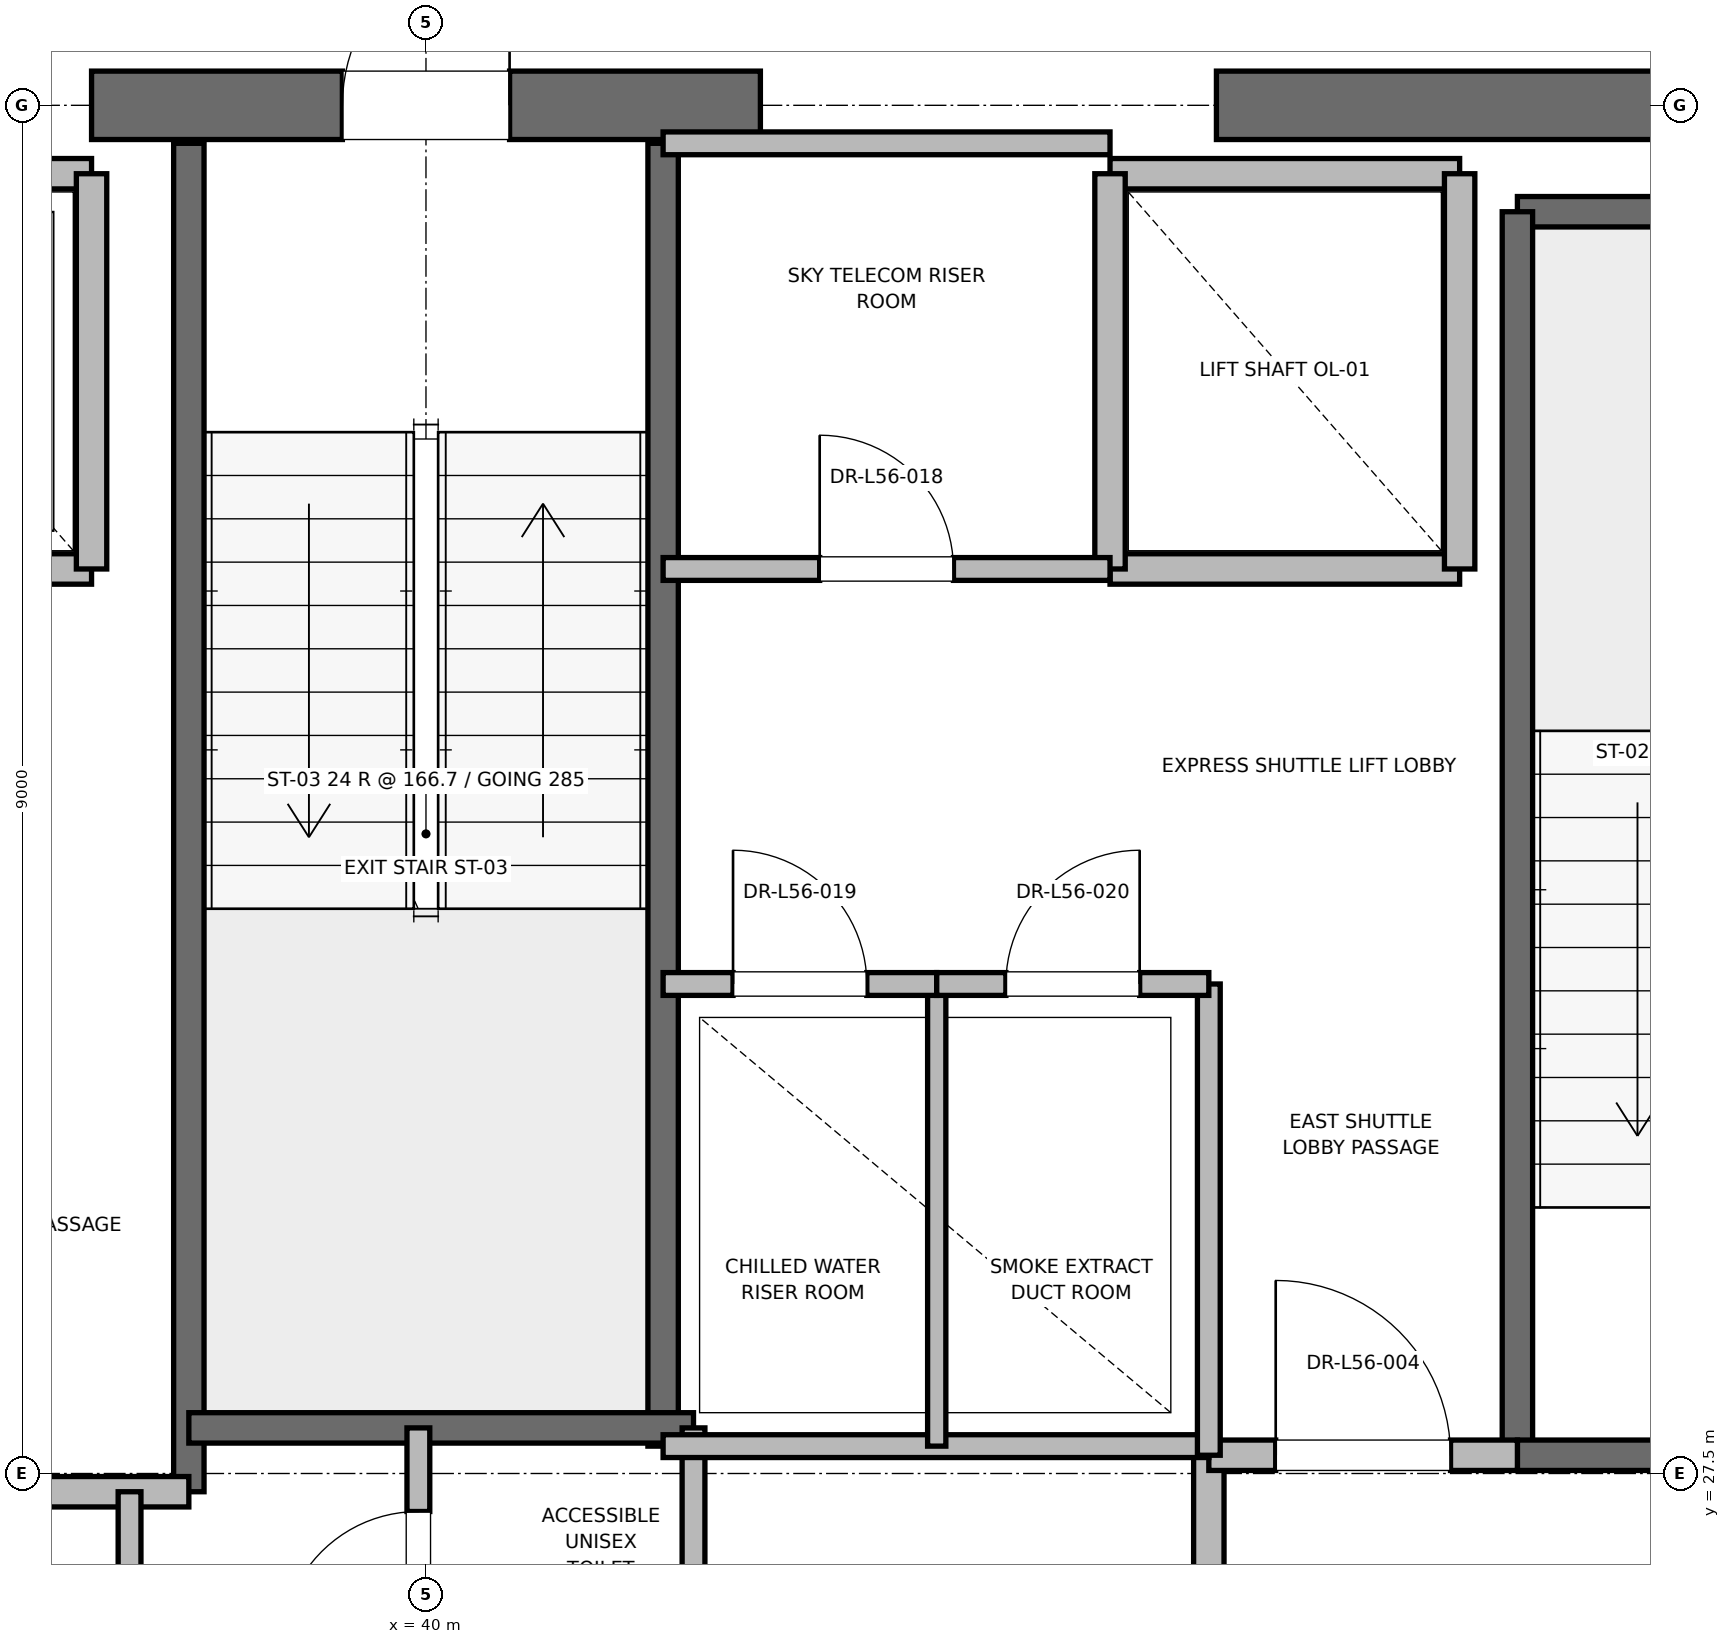
"""IFC4 building model, lengths in metres.
Left out: names, types, materials, properties, quantities, classifications, styles, units other than length and angle.
Written with IfcOpenShell. Run it as: python <this file> out.ifc"""

import sys

from ifc_helpers import new_model, si_unit, direction, frame, frame_2d, origin, place, context, subcontext, project, spatial, rectangle, extrude, element, fill, save


model = new_model("IFC4")
c1 = context("Model", 3, precision=1e-05, world=origin(), true_north=direction((0.0, 1.0)))
c2 = subcontext(c1, "Body", "Model", "MODEL_VIEW")
j1 = project(units=[si_unit("LENGTHUNIT", "METRE"), si_unit("PLANEANGLEUNIT", "RADIAN")], contexts=[c1])
p1 = place(None, origin())
s1 = spatial("IfcSite", under=j1, at=p1, CompositionType="ELEMENT")
p2 = place(p1, origin())
s2 = spatial("IfcBuilding", under=s1, at=p2, CompositionType="ELEMENT")
p3 = place(p2, frame((0.0, 0.0, 243.2)))
s3 = spatial("IfcBuildingStorey", under=s2, at=p3, CompositionType="ELEMENT", Elevation=243.2)
p4 = place(p3, frame((37.8, 36.5, 0.0), z_axis=(0.0, 0.0, 1.0), x_axis=(1.0, 0.0, 0.0)))
e1 = element("IfcWall", 1, at=p4, inside=s3, PredefinedType="SHEAR", context=c2, shape_type="SweptSolid", body=[
    extrude(rectangle(XDim=4.4, YDim=0.45, at=frame_2d((2.2, 0.0))), origin(), (0.0, 0.0, 1.0), 3.785),
])
p5 = place(p4, frame((1.65, 0.0, 0.0)))
e2 = element("IfcOpeningElement", 2, at=p5, cuts=e1, PredefinedType="OPENING", context=c2, shape_type="SweptSolid", body=[
    extrude(rectangle(XDim=1.1, YDim=2.15, at=frame_2d((0.55, 1.075))), frame((0.0, 0.225, 0.0), z_axis=(0.0, -1.0, 0.0), x_axis=(1.0, 0.0, 0.0)), (0.0, 0.0, 1.0), 0.45),
])
p6 = place(p3, frame((45.2, 36.5, 0.0), z_axis=(0.0, 0.0, 1.0), x_axis=(1.0, 0.0, 0.0)))
e3 = element("IfcWall", 3, at=p6, inside=s3, PredefinedType="SHEAR", context=c2, shape_type="SweptSolid", body=[
    extrude(rectangle(XDim=5.8, YDim=0.45, at=frame_2d((2.9, 0.0))), origin(), (0.0, 0.0, 1.0), 3.785),
])
p7 = place(p3, frame((47.18, 35.8, 0.0), z_axis=(0.0, 0.0, 1.0), x_axis=(1.0, 0.0, 0.0)))
e4 = element("IfcWall", 4, at=p7, inside=s3, PredefinedType="SOLIDWALL", context=c2, shape_type="SweptSolid", body=[
    extrude(rectangle(XDim=3.12, YDim=0.2, at=frame_2d((1.56, 0.0))), origin(), (0.0, 0.0, 1.0), 3.785),
])
p8 = place(p3, frame((47.18, 27.62, 0.0), z_axis=(0.0, 0.0, 1.0), x_axis=(0.0, 1.0, 0.0)))
e5 = element("IfcWall", 5, at=p8, inside=s3, PredefinedType="SOLIDWALL", context=c2, shape_type="SweptSolid", body=[
    extrude(rectangle(XDim=8.18, YDim=0.2, at=frame_2d((4.09, 0.0))), origin(), (0.0, 0.0, 1.0), 3.785),
])
p9 = place(p3, frame((47.18, 27.62, 0.0), z_axis=(0.0, 0.0, 1.0), x_axis=(1.0, 0.0, 0.0)))
e6 = element("IfcWall", 6, at=p9, inside=s3, PredefinedType="SOLIDWALL", context=c2, shape_type="SweptSolid", body=[
    extrude(rectangle(XDim=3.12, YDim=0.2, at=frame_2d((1.56, 0.0))), origin(), (0.0, 0.0, 1.0), 3.785),
])
p10 = place(p9, frame((1.01, 0.0, 0.0)))
e7 = element("IfcOpeningElement", 7, at=p10, cuts=e6, PredefinedType="OPENING", context=c2, shape_type="SweptSolid", body=[
    extrude(rectangle(XDim=1.1, YDim=2.15, at=frame_2d((0.55, 1.075))), frame((0.0, 0.1, 0.0), z_axis=(0.0, -1.0, 0.0), x_axis=(1.0, 0.0, 0.0)), (0.0, 0.0, 1.0), 0.2),
])
p11 = place(p3, frame((38.44, 27.38, 0.0), z_axis=(0.0, 0.0, 1.0), x_axis=(0.0, 1.0, 0.0)))
e8 = element("IfcWall", 8, at=p11, inside=s3, PredefinedType="SOLIDWALL", context=c2, shape_type="SweptSolid", body=[
    extrude(rectangle(XDim=8.87, YDim=0.2, at=frame_2d((4.435, 0.0))), origin(), (0.0, 0.0, 1.0), 3.785),
])
p12 = place(p3, frame((41.56, 27.68, 0.0), z_axis=(0.0, 0.0, 1.0), x_axis=(0.0, 1.0, 0.0)))
e9 = element("IfcWall", 9, at=p12, inside=s3, PredefinedType="SOLIDWALL", context=c2, shape_type="SweptSolid", body=[
    extrude(rectangle(XDim=8.57, YDim=0.2, at=frame_2d((4.285, 0.0))), origin(), (0.0, 0.0, 1.0), 3.785),
])
p13 = place(p3, frame((38.44, 27.8, 0.0), z_axis=(0.0, 0.0, 1.0), x_axis=(1.0, 0.0, 0.0)))
e10 = element("IfcWall", 10, at=p13, inside=s3, PredefinedType="SOLIDWALL", context=c2, shape_type="SweptSolid", body=[
    extrude(rectangle(XDim=3.32, YDim=0.2, at=frame_2d((1.66, 0.0))), origin(), (0.0, 0.0, 1.0), 3.785),
])
p14 = place(p3, frame((32.82, 27.38, 0.0), z_axis=(0.0, 0.0, 1.0), x_axis=(1.0, 0.0, 0.0)))
e11 = element("IfcWall", 11, at=p14, inside=s3, PredefinedType="PARTITIONING", context=c2, shape_type="SweptSolid", body=[
    extrude(rectangle(XDim=5.62, YDim=0.2, at=frame_2d((2.81, 0.0))), origin(), (0.0, 0.0, 1.0), 3.785),
])
p15 = place(p3, frame((45.15, 24.25, 0.0), z_axis=(0.0, 0.0, 1.0), x_axis=(0.0, 1.0, 0.0)))
e12 = element("IfcWall", 12, at=p15, inside=s3, PredefinedType="PARTITIONING", context=c2, shape_type="SweptSolid", body=[
    extrude(rectangle(XDim=3.37, YDim=0.2, at=frame_2d((1.685, 0.0))), origin(), (0.0, 0.0, 1.0), 3.785),
])
p16 = place(p3, frame((45.15, 27.62, 0.0), z_axis=(0.0, 0.0, 1.0), x_axis=(1.0, 0.0, 0.0)))
e13 = element("IfcWall", 13, at=p16, inside=s3, PredefinedType="PARTITIONING", context=c2, shape_type="SweptSolid", body=[
    extrude(rectangle(XDim=2.03, YDim=0.2, at=frame_2d((1.015, 0.0))), origin(), (0.0, 0.0, 1.0), 3.785),
])
p17 = place(p16, frame((0.44, 0.0, 0.0)))
e14 = element("IfcOpeningElement", 14, at=p17, cuts=e13, PredefinedType="OPENING", context=c2, shape_type="SweptSolid", body=[
    extrude(rectangle(XDim=1.15, YDim=2.2, at=frame_2d((0.575, 1.1))), frame((0.0, 0.1, 0.0), z_axis=(0.0, -1.0, 0.0), x_axis=(1.0, 0.0, 0.0)), (0.0, 0.0, 1.0), 0.2),
])
p18 = place(p3, frame((35.5, 33.45, 0.0), z_axis=(0.0, 0.0, 1.0), x_axis=(1.0, 0.0, 0.0)))
e15 = element("IfcWall", 15, at=p18, inside=s3, PredefinedType="SOLIDWALL", context=c2, shape_type="SweptSolid", body=[
    extrude(rectangle(XDim=2.3, YDim=0.2, at=frame_2d((1.15, 0.0))), origin(), (0.0, 0.0, 1.0), 3.785),
])
p19 = place(p18, frame((0.6, 0.0, 0.0)))
e16 = element("IfcOpeningElement", 16, at=p19, cuts=e15, PredefinedType="OPENING", context=c2, shape_type="SweptSolid", body=[
    extrude(rectangle(XDim=1.1, YDim=2.2, at=frame_2d((0.55, 1.1))), frame((0.0, 0.1, 0.0), z_axis=(0.0, -1.0, 0.0), x_axis=(1.0, 0.0, 0.0)), (0.0, 0.0, 1.0), 0.2),
])
p20 = place(p3, frame((37.8, 36.05, 0.0), z_axis=(0.0, 0.0, 1.0), x_axis=(-1.0, 0.0, 0.0)))
e17 = element("IfcWall", 17, at=p20, inside=s3, PredefinedType="SOLIDWALL", context=c2, shape_type="SweptSolid", body=[
    extrude(rectangle(XDim=2.3, YDim=0.2, at=frame_2d((1.15, 0.0))), origin(), (0.0, 0.0, 1.0), 2.865),
])
p21 = place(p3, frame((37.8, 33.45, 0.0), z_axis=(0.0, 0.0, 1.0), x_axis=(0.0, 1.0, 0.0)))
e18 = element("IfcWall", 18, at=p21, inside=s3, PredefinedType="SOLIDWALL", context=c2, shape_type="SweptSolid", body=[
    extrude(rectangle(XDim=2.6, YDim=0.2, at=frame_2d((1.3, 0.0))), origin(), (0.0, 0.0, 1.0), 2.865),
])
p22 = place(p3, frame((44.5, 33.45, 0.0), z_axis=(0.0, 0.0, 1.0), x_axis=(1.0, 0.0, 0.0)))
e19 = element("IfcWall", 19, at=p22, inside=s3, PredefinedType="SOLIDWALL", context=c2, shape_type="SweptSolid", body=[
    extrude(rectangle(XDim=2.3, YDim=0.2, at=frame_2d((1.15, 0.0))), origin(), (0.0, 0.0, 1.0), 3.785),
])
p23 = place(p3, frame((46.8, 36.05, 0.0), z_axis=(0.0, 0.0, 1.0), x_axis=(-1.0, 0.0, 0.0)))
e20 = element("IfcWall", 20, at=p23, inside=s3, PredefinedType="SOLIDWALL", context=c2, shape_type="SweptSolid", body=[
    extrude(rectangle(XDim=2.3, YDim=0.2, at=frame_2d((1.15, 0.0))), origin(), (0.0, 0.0, 1.0), 2.865),
])
p24 = place(p3, frame((44.5, 36.05, 0.0), z_axis=(0.0, 0.0, 1.0), x_axis=(0.0, -1.0, 0.0)))
e21 = element("IfcWall", 21, at=p24, inside=s3, PredefinedType="SOLIDWALL", context=c2, shape_type="SweptSolid", body=[
    extrude(rectangle(XDim=2.6, YDim=0.2, at=frame_2d((1.3, 0.0))), origin(), (0.0, 0.0, 1.0), 2.865),
])
p25 = place(p3, frame((46.8, 33.45, 0.0), z_axis=(0.0, 0.0, 1.0), x_axis=(0.0, 1.0, 0.0)))
e22 = element("IfcWall", 22, at=p25, inside=s3, PredefinedType="SOLIDWALL", context=c2, shape_type="SweptSolid", body=[
    extrude(rectangle(XDim=2.6, YDim=0.2, at=frame_2d((1.3, 0.0))), origin(), (0.0, 0.0, 1.0), 3.785),
])
p26 = place(p3, frame((41.76, 23.8, 0.0), z_axis=(0.0, 0.0, 1.0), x_axis=(0.0, 1.0, 0.0)))
e23 = element("IfcWall", 23, at=p26, inside=s3, PredefinedType="PARTITIONING", context=c2, shape_type="SweptSolid", body=[
    extrude(rectangle(XDim=4.0, YDim=0.15, at=frame_2d((2.0, 0.0))), origin(), (0.0, 0.0, 1.0), 2.85),
])
p27 = place(p3, frame((39.95, 25.8, 0.0), z_axis=(0.0, 0.0, 1.0), x_axis=(0.0, 1.0, 0.0)))
e24 = element("IfcWall", 24, at=p27, inside=s3, PredefinedType="PARTITIONING", context=c2, shape_type="SweptSolid", body=[
    extrude(rectangle(XDim=2.0, YDim=0.15, at=frame_2d((1.0, 0.0))), origin(), (0.0, 0.0, 1.0), 2.85),
])
p28 = place(p27, frame((0.55, 0.0, 0.0)))
e25 = element("IfcOpeningElement", 25, at=p28, cuts=e24, PredefinedType="OPENING", context=c2, shape_type="SweptSolid", body=[
    extrude(rectangle(XDim=0.9, YDim=2.1, at=frame_2d((0.45, 1.05))), frame((0.0, 0.075, 0.0), z_axis=(0.0, -1.0, 0.0), x_axis=(1.0, 0.0, 0.0)), (0.0, 0.0, 1.0), 0.15),
])
p29 = place(p3, frame((38.05, 23.06, 0.0), z_axis=(0.0, 0.0, 1.0), x_axis=(0.0, 1.0, 0.0)))
e26 = element("IfcWall", 26, at=p29, inside=s3, PredefinedType="PARTITIONING", context=c2, shape_type="SweptSolid", body=[
    extrude(rectangle(XDim=4.32, YDim=0.15, at=frame_2d((2.16, 0.0))), origin(), (0.0, 0.0, 1.0), 2.85),
])
p30 = place(p29, frame((1.66, 0.0, 0.0)))
e27 = element("IfcOpeningElement", 27, at=p30, cuts=e26, PredefinedType="OPENING", context=c2, shape_type="SweptSolid", body=[
    extrude(rectangle(XDim=1.0, YDim=2.15, at=frame_2d((0.5, 1.075))), frame((0.0, 0.075, 0.0), z_axis=(0.0, -1.0, 0.0), x_axis=(1.0, 0.0, 0.0)), (0.0, 0.0, 1.0), 0.15),
])
p31 = place(p3, frame((41.56, 27.68, 0.0), z_axis=(0.0, 0.0, 1.0), x_axis=(1.0, 0.0, 0.0)))
e28 = element("IfcWall", 28, at=p31, inside=s3, PredefinedType="PARTITIONING", context=c2, shape_type="SweptSolid", body=[
    extrude(rectangle(XDim=3.59, YDim=0.15, at=frame_2d((1.795, 0.0))), origin(), (0.0, 0.0, 1.0), 2.85),
])
p32 = place(p3, frame((45.15, 27.62, 0.0), z_axis=(0.0, 0.0, 1.0), x_axis=(0.0, 1.0, 0.0)))
e29 = element("IfcWall", 29, at=p32, inside=s3, PredefinedType="PARTITIONING", context=c2, shape_type="SweptSolid", body=[
    extrude(rectangle(XDim=3.1, YDim=0.15, at=frame_2d((1.55, 0.0))), origin(), (0.0, 0.0, 1.0), 2.85),
])
p33 = place(p3, frame((43.36, 27.68, 0.0), z_axis=(0.0, 0.0, 1.0), x_axis=(0.0, 1.0, 0.0)))
e30 = element("IfcWall", 30, at=p33, inside=s3, PredefinedType="PARTITIONING", context=c2, shape_type="SweptSolid", body=[
    extrude(rectangle(XDim=3.04, YDim=0.12, at=frame_2d((1.52, 0.0))), origin(), (0.0, 0.0, 1.0), 2.85),
])
p34 = place(p3, frame((41.56, 30.72, 0.0), z_axis=(0.0, 0.0, 1.0), x_axis=(1.0, 0.0, 0.0)))
e31 = element("IfcWall", 31, at=p34, inside=s3, PredefinedType="PARTITIONING", context=c2, shape_type="SweptSolid", body=[
    extrude(rectangle(XDim=1.8, YDim=0.15, at=frame_2d((0.9, 0.0))), origin(), (0.0, 0.0, 1.0), 2.85),
])
p35 = place(p34, frame((0.46, 0.0, 0.0)))
e32 = element("IfcOpeningElement", 32, at=p35, cuts=e31, PredefinedType="OPENING", context=c2, shape_type="SweptSolid", body=[
    extrude(rectangle(XDim=0.88, YDim=2.1, at=frame_2d((0.44, 1.05))), frame((0.0, 0.075, 0.0), z_axis=(0.0, -1.0, 0.0), x_axis=(1.0, 0.0, 0.0)), (0.0, 0.0, 1.0), 0.15),
])
p36 = place(p3, frame((43.36, 30.72, 0.0), z_axis=(0.0, 0.0, 1.0), x_axis=(1.0, 0.0, 0.0)))
e33 = element("IfcWall", 33, at=p36, inside=s3, PredefinedType="PARTITIONING", context=c2, shape_type="SweptSolid", body=[
    extrude(rectangle(XDim=1.79, YDim=0.15, at=frame_2d((0.895, 0.0))), origin(), (0.0, 0.0, 1.0), 2.85),
])
p37 = place(p36, frame((0.455, 0.0, 0.0)))
e34 = element("IfcOpeningElement", 34, at=p37, cuts=e33, PredefinedType="OPENING", context=c2, shape_type="SweptSolid", body=[
    extrude(rectangle(XDim=0.88, YDim=2.1, at=frame_2d((0.44, 1.05))), frame((0.0, 0.075, 0.0), z_axis=(0.0, -1.0, 0.0), x_axis=(1.0, 0.0, 0.0)), (0.0, 0.0, 1.0), 0.15),
])
p38 = place(p3, frame((41.56, 36.25, 0.0), z_axis=(0.0, 0.0, 1.0), x_axis=(1.0, 0.0, 0.0)))
e35 = element("IfcWall", 35, at=p38, inside=s3, PredefinedType="PARTITIONING", context=c2, shape_type="SweptSolid", body=[
    extrude(rectangle(XDim=2.94, YDim=0.15, at=frame_2d((1.47, 0.0))), origin(), (0.0, 0.0, 1.0), 2.85),
])
p39 = place(p3, frame((41.56, 33.45, 0.0), z_axis=(0.0, 0.0, 1.0), x_axis=(1.0, 0.0, 0.0)))
e36 = element("IfcWall", 36, at=p39, inside=s3, PredefinedType="PARTITIONING", context=c2, shape_type="SweptSolid", body=[
    extrude(rectangle(XDim=2.94, YDim=0.15, at=frame_2d((1.47, 0.0))), origin(), (0.0, 0.0, 1.0), 2.85),
])
p40 = place(p39, frame((1.03, 0.0, 0.0)))
e37 = element("IfcOpeningElement", 37, at=p40, cuts=e36, PredefinedType="OPENING", context=c2, shape_type="SweptSolid", body=[
    extrude(rectangle(XDim=0.88, YDim=2.1, at=frame_2d((0.44, 1.05))), frame((0.0, 0.075, 0.0), z_axis=(0.0, -1.0, 0.0), x_axis=(1.0, 0.0, 0.0)), (0.0, 0.0, 1.0), 0.15),
])
p41 = place(p5, origin())
e38 = element("IfcDoor", 38, at=p41, inside=s3, OperationType="SINGLE_SWING_RIGHT", PredefinedType="DOOR", context=c2, shape_type="SweptSolid", body=[
    extrude(rectangle(XDim=1.1, YDim=2.15, at=frame_2d((0.55, 1.075))), frame((0.0, 0.025, 0.0), z_axis=(0.0, -1.0, 0.0), x_axis=(1.0, 0.0, 0.0)), (0.0, 0.0, 1.0), 0.05),
])
fill(e2, e38)
p42 = place(p17, origin())
e39 = element("IfcDoor", 39, at=p42, inside=s3, OperationType="SINGLE_SWING_LEFT", PredefinedType="DOOR", context=c2, shape_type="SweptSolid", body=[
    extrude(rectangle(XDim=1.15, YDim=2.2, at=frame_2d((0.575, 1.1))), frame((0.0, 0.025, 0.0), z_axis=(0.0, -1.0, 0.0), x_axis=(1.0, 0.0, 0.0)), (0.0, 0.0, 1.0), 0.05),
])
fill(e14, e39)
p43 = place(p28, origin())
e40 = element("IfcDoor", 40, at=p43, inside=s3, OperationType="SINGLE_SWING_LEFT", PredefinedType="DOOR", context=c2, shape_type="SweptSolid", body=[
    extrude(rectangle(XDim=0.9, YDim=2.1, at=frame_2d((0.45, 1.05))), frame((0.0, 0.025, 0.0), z_axis=(0.0, -1.0, 0.0), x_axis=(1.0, 0.0, 0.0)), (0.0, 0.0, 1.0), 0.05),
])
fill(e25, e40)
p44 = place(p35, origin())
e41 = element("IfcDoor", 41, at=p44, inside=s3, OperationType="SINGLE_SWING_LEFT", PredefinedType="DOOR", context=c2, shape_type="SweptSolid", body=[
    extrude(rectangle(XDim=0.88, YDim=2.1, at=frame_2d((0.44, 1.05))), frame((0.0, 0.025, 0.0), z_axis=(0.0, -1.0, 0.0), x_axis=(1.0, 0.0, 0.0)), (0.0, 0.0, 1.0), 0.05),
])
fill(e32, e41)
p45 = place(p37, origin())
e42 = element("IfcDoor", 42, at=p45, inside=s3, OperationType="SINGLE_SWING_RIGHT", PredefinedType="DOOR", context=c2, shape_type="SweptSolid", body=[
    extrude(rectangle(XDim=0.88, YDim=2.1, at=frame_2d((0.44, 1.05))), frame((0.0, 0.025, 0.0), z_axis=(0.0, -1.0, 0.0), x_axis=(1.0, 0.0, 0.0)), (0.0, 0.0, 1.0), 0.05),
])
fill(e34, e42)
p46 = place(p40, origin())
e43 = element("IfcDoor", 43, at=p46, inside=s3, OperationType="SINGLE_SWING_LEFT", PredefinedType="DOOR", context=c2, shape_type="SweptSolid", body=[
    extrude(rectangle(XDim=0.88, YDim=2.1, at=frame_2d((0.44, 1.05))), frame((0.0, 0.025, 0.0), z_axis=(0.0, -1.0, 0.0), x_axis=(1.0, 0.0, 0.0)), (0.0, 0.0, 1.0), 0.05),
])
fill(e37, e43)
save(model, sys.argv[1])
